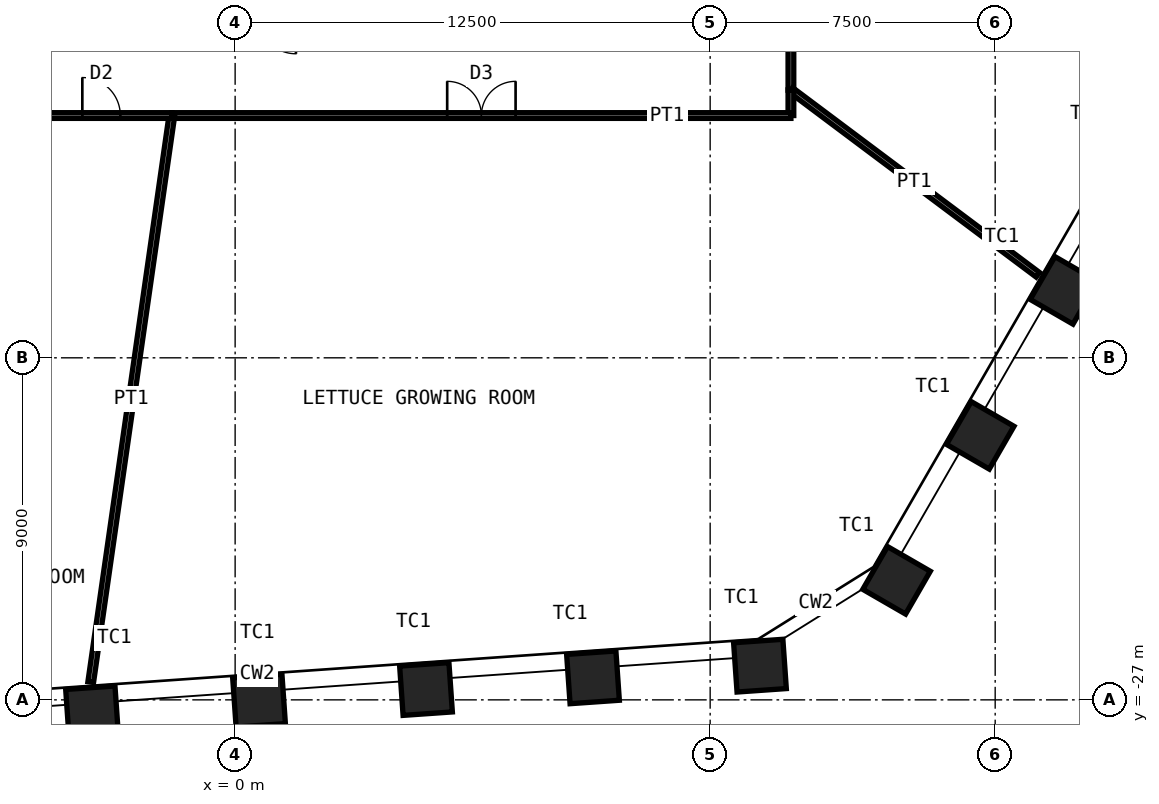
"""IFC4 building model, lengths in metres.
Left out: names, types, materials, properties, quantities, classifications, styles, units other than length and angle.
Written with IfcOpenShell. Run it as: python <this file> out.ifc"""

import sys

from ifc_helpers import new_model, si_unit, direction, frame, frame_2d, origin, origin_2d, place, context, subcontext, project, spatial, rectangle, hollow_rectangle, extrude, element, fill, save


model = new_model("IFC4")
c1 = context("Model", 3, precision=1e-05, world=origin(), true_north=direction((0.0, 1.0)))
c2 = subcontext(c1, "Body", "Model", "MODEL_VIEW")
j1 = project(units=[si_unit("LENGTHUNIT", "METRE"), si_unit("PLANEANGLEUNIT", "RADIAN")], contexts=[c1])
p1 = place(None, origin())
s1 = spatial("IfcSite", under=j1, at=p1, CompositionType="ELEMENT")
p2 = place(p1, origin())
s2 = spatial("IfcBuilding", under=s1, at=p2, CompositionType="ELEMENT")
p3 = place(p2, frame((0.0, 0.0, 47.0)))
s3 = spatial("IfcBuildingStorey", under=s2, at=p3, CompositionType="ELEMENT", Elevation=47.0)
for number, where, z_axis, x_axis in (
    (1, (21.809, -16.225, 0.0), (0.0, 0.0, 1.0), (0.5, 0.866, 0.0)),
    (2, (19.607, -20.04, 0.0), (0.0, 0.0, 1.0), (0.5, 0.866, 0.0)),
    (3, (17.405, -23.854, 0.0), (0.0, 0.0, 1.0), (0.5, 0.866, 0.0)),
    (4, (13.811, -26.1, 0.0), (0.0, 0.0, 1.0), (0.998, 0.07, 0.0)),
    (5, (9.417, -26.407, 0.0), (0.0, 0.0, 1.0), (0.998, 0.07, 0.0)),
    (6, (5.023, -26.715, 0.0), (0.0, 0.0, 1.0), (0.998, 0.07, 0.0)),
    (7, (0.629, -27.022, 0.0), (0.0, 0.0, 1.0), (0.998, 0.07, 0.0)),
    (8, (-3.765, -27.329, 0.0), (0.0, 0.0, 1.0), (0.998, 0.07, 0.0)),
):
    element("IfcColumn", number, at=place(p3, frame(where, z_axis=z_axis, x_axis=x_axis)), inside=s3, PredefinedType="COLUMN", context=c2, shape_type="SweptSolid", body=[
        extrude(hollow_rectangle(XDim=1.3, YDim=1.3, WallThickness=0.1, at=origin_2d()), origin(), (0.0, 0.0, 1.0), 5.0),
    ])
p4 = place(p3, frame((14.625, -2.331, 0.0), z_axis=(0.0, 0.0, 1.0), x_axis=(0.0, -1.0, 0.0)))
e9 = element("IfcWall", 9, at=p4, inside=s3, PredefinedType="PARTITIONING", context=c2, shape_type="SweptSolid", body=[
    extrude(rectangle(XDim=8.62, YDim=0.15, at=frame_2d((4.31, 0.0))), origin(), (0.0, 0.0, 1.0), 4.8),
])
p5 = place(p4, frame((3.41, 0.0, 0.0)))
e10 = element("IfcOpeningElement", 10, at=p5, cuts=e9, PredefinedType="OPENING", context=c2, shape_type="SweptSolid", body=[
    extrude(rectangle(XDim=1.8, YDim=2.4, at=frame_2d((0.9, 1.2))), frame((0.0, 0.085, 0.0), z_axis=(0.0, -1.0, 0.0), x_axis=(1.0, 0.0, 0.0)), (0.0, 0.0, 1.0), 0.17),
])
p6 = place(p3, frame((21.123, -15.815, 0.0), z_axis=(0.0, 0.0, 1.0), x_axis=(-0.800490565123, 0.599345355492, 0.0)))
e11 = element("IfcWall", 11, at=p6, inside=s3, PredefinedType="PARTITIONING", context=c2, shape_type="SweptSolid", body=[
    extrude(rectangle(XDim=8.118, YDim=0.15, at=frame_2d((4.059, 0.0))), origin(), (0.0, 0.0, 1.0), 3.7),
])
p7 = place(p3, frame((14.625, -10.95, 0.0), z_axis=(0.0, 0.0, 1.0), x_axis=(0.0, -1.0, 0.0)))
e12 = element("IfcWall", 12, at=p7, inside=s3, PredefinedType="PARTITIONING", context=c2, shape_type="SweptSolid", body=[
    extrude(rectangle(XDim=0.675, YDim=0.15, at=frame_2d((0.337, 0.0))), origin(), (0.0, 0.0, 1.0), 4.8),
])
p8 = place(p3, frame((14.625, -11.625, 0.0), z_axis=(0.0, 0.0, 1.0), x_axis=(-1.0, 0.0, 0.0)))
e13 = element("IfcWall", 13, at=p8, inside=s3, PredefinedType="PARTITIONING", context=c2, shape_type="SweptSolid", body=[
    extrude(rectangle(XDim=16.29, YDim=0.15, at=frame_2d((8.145, 0.0))), origin(), (0.0, 0.0, 1.0), 4.8),
])
p9 = place(p8, frame((7.245, 0.0, 0.0)))
e14 = element("IfcOpeningElement", 14, at=p9, cuts=e13, PredefinedType="OPENING", context=c2, shape_type="SweptSolid", body=[
    extrude(rectangle(XDim=1.8, YDim=2.4, at=frame_2d((0.9, 1.2))), frame((0.0, 0.085, 0.0), z_axis=(0.0, -1.0, 0.0), x_axis=(1.0, 0.0, 0.0)), (0.0, 0.0, 1.0), 0.17),
])
p10 = place(p3, frame((-3.8, -26.532, 0.0), z_axis=(0.0, 0.0, 1.0), x_axis=(0.14177542097, 0.989898848372, 0.0)))
e15 = element("IfcWall", 15, at=p10, inside=s3, PredefinedType="PARTITIONING", context=c2, shape_type="SweptSolid", body=[
    extrude(rectangle(XDim=15.059, YDim=0.15, at=frame_2d((7.53, 0.0))), origin(), (0.0, 0.0, 1.0), 3.7),
])
p11 = place(p3, frame((-1.665, -11.625, 0.0), z_axis=(0.0, 0.0, 1.0), x_axis=(-1.0, 0.0, 0.0)))
e16 = element("IfcWall", 16, at=p11, inside=s3, PredefinedType="PARTITIONING", context=c2, shape_type="SweptSolid", body=[
    extrude(rectangle(XDim=3.712, YDim=0.15, at=frame_2d((1.856, 0.0))), origin(), (0.0, 0.0, 1.0), 4.8),
])
p12 = place(p11, frame((1.356, 0.0, 0.0)))
e17 = element("IfcOpeningElement", 17, at=p12, cuts=e16, PredefinedType="OPENING", context=c2, shape_type="SweptSolid", body=[
    extrude(rectangle(XDim=1.0, YDim=2.4, at=frame_2d((0.5, 1.2))), frame((0.0, 0.085, 0.0), z_axis=(0.0, -1.0, 0.0), x_axis=(1.0, 0.0, 0.0)), (0.0, 0.0, 1.0), 0.17),
])
p13 = place(p9, origin())
e18 = element("IfcDoor", 18, at=p13, inside=s3, OperationType="DOUBLE_DOOR_DOUBLE_SWING", PredefinedType="DOOR", context=c2, shape_type="SweptSolid", body=[
    extrude(rectangle(XDim=1.8, YDim=2.4, at=frame_2d((0.9, 1.2))), frame((0.0, 0.025, 0.0), z_axis=(0.0, -1.0, 0.0), x_axis=(1.0, 0.0, 0.0)), (0.0, 0.0, 1.0), 0.05),
])
fill(e14, e18)
p14 = place(p12, origin())
e19 = element("IfcDoor", 19, at=p14, inside=s3, OperationType="SINGLE_SWING_RIGHT", PredefinedType="DOOR", context=c2, shape_type="SweptSolid", body=[
    extrude(rectangle(XDim=1.0, YDim=2.4, at=frame_2d((0.5, 1.2))), frame((0.0, 0.025, 0.0), z_axis=(0.0, -1.0, 0.0), x_axis=(1.0, 0.0, 0.0)), (0.0, 0.0, 1.0), 0.05),
])
fill(e17, e19)
save(model, sys.argv[1])
